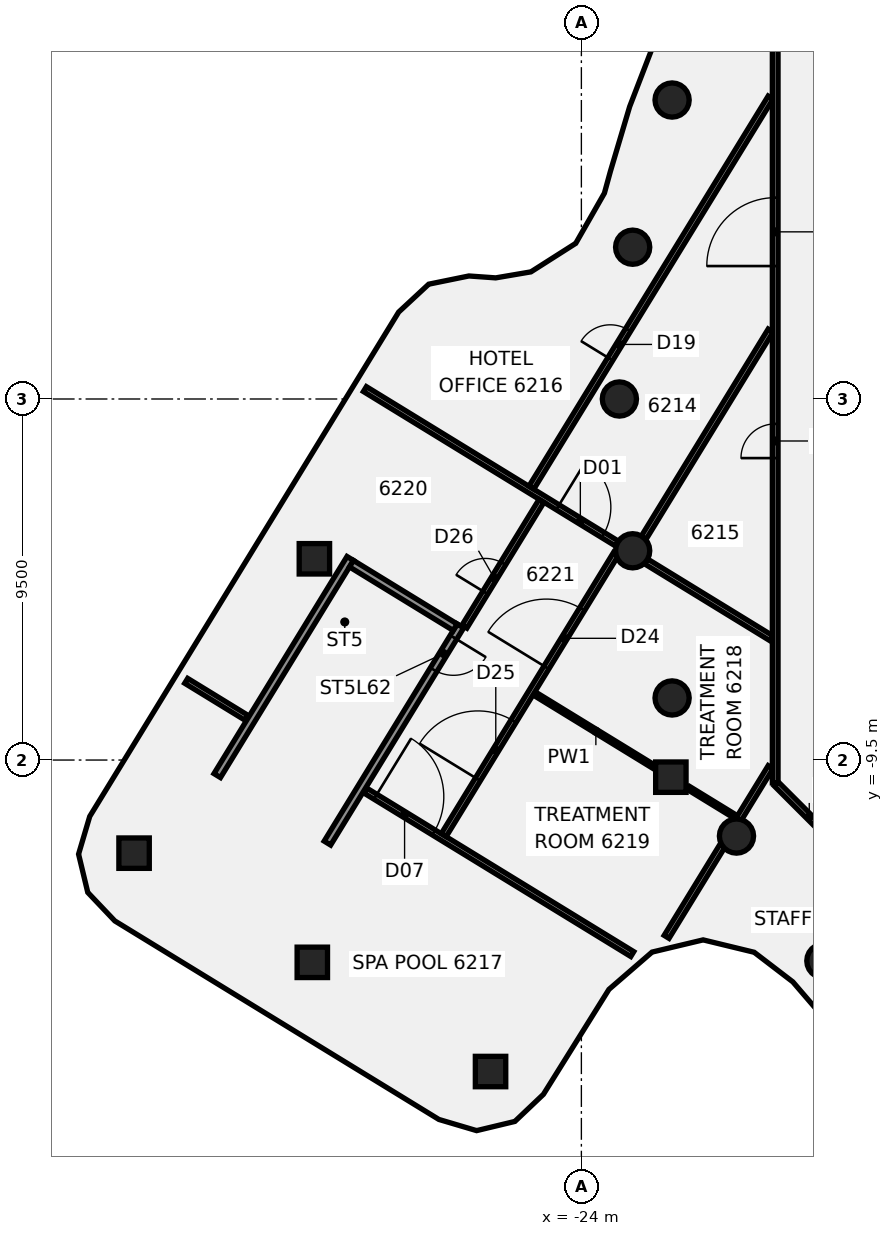
"""IFC4 building model, lengths in metres.
Left out: names, types, materials, properties, quantities, classifications, styles, units other than length and angle.
Written with IfcOpenShell. Run it as: python <this file> out.ifc"""

import sys

from ifc_helpers import new_model, si_unit, direction, frame, frame_2d, origin, origin_2d, place, context, subcontext, project, spatial, polyline, rectangle, circle, outline, extrude, element, fill, save


model = new_model("IFC4")
c1 = context("Model", 3, precision=1e-05, world=origin(), true_north=direction((0.0, 1.0)))
c2 = subcontext(c1, "Body", "Model", "MODEL_VIEW")
j1 = project(units=[si_unit("LENGTHUNIT", "METRE"), si_unit("PLANEANGLEUNIT", "RADIAN")], contexts=[c1])
p1 = place(None, origin())
s1 = spatial("IfcSite", under=j1, at=p1, CompositionType="ELEMENT")
p2 = place(p1, origin())
s2 = spatial("IfcBuilding", under=s1, at=p2, CompositionType="ELEMENT")
p3 = place(p2, frame((0.0, 0.0, 245.1)))
s3 = spatial("IfcBuildingStorey", under=s2, at=p3, CompositionType="ELEMENT", Elevation=245.1)
for number, where, z_axis, x_axis in (
    (1, (-21.613, 7.866, -0.14), (0.0, 0.0, 1.0), (1.0, 0.0, 0.0)),
    (2, (-22.651, 3.994, -0.14), (0.0, 0.0, 1.0), (1.0, 0.0, 0.0)),
    (3, (-23.0, 0.0, -0.14), (0.0, 0.0, 1.0), (1.0, 0.0, 0.0)),
    (4, (-22.651, -3.994, -0.14), (0.0, 0.0, 1.0), (1.0, 0.0, 0.0)),
    (5, (-21.613, -7.866, -0.14), (0.0, 0.0, 1.0), (1.0, 0.0, 0.0)),
    (6, (-19.919, -11.5, -0.14), (0.0, 0.0, 1.0), (1.0, 0.0, 0.0)),
    (7, (-17.619, -14.784, -0.14), (0.0, 0.0, 1.0), (1.0, 0.0, 0.0)),
):
    element("IfcColumn", number, at=place(p3, frame(where, z_axis=z_axis, x_axis=x_axis)), inside=s3, PredefinedType="COLUMN", context=c2, shape_type="SweptSolid", body=[
        extrude(circle(Radius=0.45, at=origin_2d()), origin(), (0.0, 0.0, 1.0), 3.6),
    ])
p4 = place(p3, frame((-21.646, -9.951, -0.139), z_axis=(0.050289032263, 0.002304349187, 0.998732047753), x_axis=(-0.852234898638, 0.521494023038, 0.041709249322)))
e8 = element("IfcColumn", 8, at=p4, inside=s3, PredefinedType="COLUMN", context=c2, shape_type="SweptSolid", body=[
    extrude(rectangle(XDim=0.8, YDim=0.8, at=origin_2d()), origin(), (0.0, 0.0, 1.0), 3.602),
])
p5 = place(p3, frame((-31.026, -4.205, -0.139), z_axis=(0.021689414604, -0.045479991248, 0.998729763094), x_axis=(0.522728696962, 0.852057085106, 0.027448735737)))
e9 = element("IfcColumn", 9, at=p5, inside=s3, PredefinedType="COLUMN", context=c2, shape_type="SweptSolid", body=[
    extrude(rectangle(XDim=0.8, YDim=0.8, at=origin_2d()), origin(), (0.0, 0.0, 1.0), 3.602),
])
p6 = place(p3, frame((-35.77, -11.95, -0.138), z_axis=(0.110986242097, 0.016732272365, 0.993681078177), x_axis=(-0.84816015737, 0.522723880647, 0.085930739847)))
e10 = element("IfcColumn", 10, at=p6, inside=s3, PredefinedType="COLUMN", context=c2, shape_type="SweptSolid", body=[
    extrude(rectangle(XDim=0.8, YDim=0.8, at=origin_2d()), origin(), (0.0, 0.0, 1.0), 3.619),
])
p7 = place(p3, frame((-31.08, -14.823, -0.138), z_axis=(0.124994195598, 0.040318536975, 0.991337917485), x_axis=(-0.84726684636, 0.524239786141, 0.085507529997)))
e11 = element("IfcColumn", 11, at=p7, inside=s3, PredefinedType="COLUMN", context=c2, shape_type="SweptSolid", body=[
    extrude(rectangle(XDim=0.8, YDim=0.8, at=origin_2d()), origin(), (0.0, 0.0, 1.0), 3.627),
])
p8 = place(p3, frame((-26.39, -17.696, -0.138), z_axis=(0.138708770206, 0.063818113433, 0.988274822843), x_axis=(-0.846851158374, 0.525000356657, 0.084957289684)))
e12 = element("IfcColumn", 12, at=p8, inside=s3, PredefinedType="COLUMN", context=c2, shape_type="SweptSolid", body=[
    extrude(rectangle(XDim=0.8, YDim=0.8, at=origin_2d()), origin(), (0.0, 0.0, 1.0), 3.638),
])
p9 = place(p3, frame((-18.872, -10.128, 0.0), z_axis=(0.0, 0.0, 1.0), x_axis=(0.707106781187, -0.707106781187, 0.0)))
e13 = element("IfcWall", 13, at=p9, inside=s3, PredefinedType="PARTITIONING", context=c2, shape_type="SweptSolid", body=[
    extrude(rectangle(XDim=2.455, YDim=0.15, at=frame_2d((1.228, 0.0))), origin(), (0.0, 0.0, 1.0), 2.864),
])
p10 = place(p3, frame((-29.696, 0.26, 0.0), z_axis=(0.0, 0.0, 1.0), x_axis=(0.852605760598, -0.522554702395, 0.0)))
e14 = element("IfcWall", 14, at=p10, inside=s3, PredefinedType="PARTITIONING", context=c2, shape_type="SweptSolid", body=[
    extrude(rectangle(XDim=7.783, YDim=0.15, at=frame_2d((3.892, 0.0))), origin(), (0.0, 0.0, 1.0), 2.864),
])
p11 = place(p10, frame((5.949, 0.0, 0.0)))
e15 = element("IfcOpeningElement", 15, at=p11, cuts=e14, PredefinedType="OPENING", context=c2, shape_type="SweptSolid", body=[
    extrude(rectangle(XDim=1.4, YDim=2.1, at=frame_2d((0.7, 1.05))), frame((0.0, 0.085, 0.0), z_axis=(0.0, -1.0, 0.0), x_axis=(1.0, 0.0, 0.0)), (0.0, 0.0, 1.0), 0.17),
])
p12 = place(p3, frame((-22.301, -4.272, 0.0), z_axis=(0.0, 0.0, 1.0), x_axis=(0.852599442673, -0.522565010648, 0.0)))
e16 = element("IfcWall", 16, at=p12, inside=s3, PredefinedType="PARTITIONING", context=c2, shape_type="SweptSolid", body=[
    extrude(rectangle(XDim=3.878, YDim=0.15, at=frame_2d((1.939, 0.0))), origin(), (0.0, 0.0, 1.0), 2.864),
])
p13 = place(p3, frame((-34.399, -7.416, 0.0), z_axis=(0.0, 0.0, 1.0), x_axis=(0.852752221209, -0.522315660519, 0.0)))
e17 = element("IfcWall", 17, at=p13, inside=s3, PredefinedType="PARTITIONING", context=c2, shape_type="SweptSolid", body=[
    extrude(rectangle(XDim=1.859, YDim=0.15, at=frame_2d((0.929, 0.0))), origin(), (0.0, 0.0, 1.0), 2.864),
])
p14 = place(p3, frame((-29.676, -10.309, 0.0), z_axis=(0.0, 0.0, 1.0), x_axis=(0.852748796972, -0.522321251016, 0.0)))
e18 = element("IfcWall", 18, at=p14, inside=s3, PredefinedType="PARTITIONING", context=c2, shape_type="SweptSolid", body=[
    extrude(rectangle(XDim=8.227, YDim=0.15, at=frame_2d((4.113, 0.0))), origin(), (0.0, 0.0, 1.0), 2.864),
])
p15 = place(p14, frame((0.3, 0.0, 0.0)))
e19 = element("IfcOpeningElement", 19, at=p15, cuts=e18, PredefinedType="OPENING", context=c2, shape_type="SweptSolid", body=[
    extrude(rectangle(XDim=1.8, YDim=2.1, at=frame_2d((0.9, 1.05))), frame((0.0, 0.085, 0.0), z_axis=(0.0, -1.0, 0.0), x_axis=(1.0, 0.0, 0.0)), (0.0, 0.0, 1.0), 0.17),
])
p16 = place(p3, frame((-25.248, -7.743, 0.0), z_axis=(0.0, 0.0, 1.0), x_axis=(0.852641647662, -0.522496144169, 0.0)))
e20 = element("IfcWall", 20, at=p16, inside=s3, PredefinedType="PARTITIONING", context=c2, shape_type="SweptSolid", body=[
    extrude(rectangle(XDim=3.822, YDim=0.1, at=frame_2d((1.911, 0.0))), origin(), (0.0, 0.0, 1.0), 2.864),
])
p17 = place(p3, frame((-21.177, -10.238, 0.0), z_axis=(0.0, 0.0, 1.0), x_axis=(0.852622654042, -0.522527137874, 0.0)))
e21 = element("IfcWall", 21, at=p17, inside=s3, PredefinedType="PARTITIONING", context=c2, shape_type="SweptSolid", body=[
    extrude(rectangle(XDim=1.476, YDim=0.1, at=frame_2d((0.738, 0.0))), origin(), (0.0, 0.0, 1.0), 2.864),
])
p18 = place(p3, frame((-21.758, -14.153, 0.0), z_axis=(0.0, 0.0, 1.0), x_axis=(0.522549830929, 0.852608746258, 0.0)))
e22 = element("IfcWall", 22, at=p18, inside=s3, PredefinedType="PARTITIONING", context=c2, shape_type="SweptSolid", body=[
    extrude(rectangle(XDim=2.809, YDim=0.15, at=frame_2d((1.405, 0.0))), origin(), (0.0, 0.0, 1.0), 2.864),
])
p19 = place(p3, frame((-19.86, -11.056, 0.0), z_axis=(0.0, 0.0, 1.0), x_axis=(0.522579863892, 0.852590338823, 0.0)))
e23 = element("IfcWall", 23, at=p19, inside=s3, PredefinedType="PARTITIONING", context=c2, shape_type="SweptSolid", body=[
    extrude(rectangle(XDim=1.608, YDim=0.15, at=frame_2d((0.804, 0.0))), origin(), (0.0, 0.0, 1.0), 2.864),
])
p20 = place(p3, frame((-25.315, -2.332, 0.0), z_axis=(0.0, 0.0, 1.0), x_axis=(0.522799283553, 0.852455810653, 0.0)))
e24 = element("IfcWall", 24, at=p20, inside=s3, PredefinedType="PARTITIONING", context=c2, shape_type="SweptSolid", body=[
    extrude(rectangle(XDim=12.041, YDim=0.15, at=frame_2d((6.021, 0.0))), origin(), (0.0, 0.0, 1.0), 2.864),
])
p21 = place(p20, frame((3.97, 0.0, 0.0)))
e25 = element("IfcOpeningElement", 25, at=p21, cuts=e24, PredefinedType="OPENING", context=c2, shape_type="SweptSolid", body=[
    extrude(rectangle(XDim=0.9, YDim=2.1, at=frame_2d((0.45, 1.05))), frame((0.0, 0.085, 0.0), z_axis=(0.0, -1.0, 0.0), x_axis=(1.0, 0.0, 0.0)), (0.0, 0.0, 1.0), 0.17),
])
p22 = place(p3, frame((-27.621, -11.474, 0.0), z_axis=(0.0, 0.0, 1.0), x_axis=(0.522331772483, 0.852742352329, 0.0)))
e26 = element("IfcWall", 26, at=p22, inside=s3, PredefinedType="PARTITIONING", context=c2, shape_type="SweptSolid", body=[
    extrude(rectangle(XDim=8.677, YDim=0.15, at=frame_2d((4.338, 0.0))), origin(), (0.0, 0.0, 1.0), 2.864),
])
p23 = place(p22, frame((5.171, 0.0, 0.0)))
e27 = element("IfcOpeningElement", 27, at=p23, cuts=e26, PredefinedType="OPENING", context=c2, shape_type="SweptSolid", body=[
    extrude(rectangle(XDim=1.8, YDim=2.1, at=frame_2d((0.9, 1.05))), frame((0.0, 0.085, 0.0), z_axis=(0.0, -1.0, 0.0), x_axis=(1.0, 0.0, 0.0)), (0.0, 0.0, 1.0), 0.17),
])
p24 = place(p22, frame((1.72, 0.0, 0.0)))
e28 = element("IfcOpeningElement", 28, at=p24, cuts=e26, PredefinedType="OPENING", context=c2, shape_type="SweptSolid", body=[
    extrude(rectangle(XDim=1.8, YDim=2.1, at=frame_2d((0.9, 1.05))), frame((0.0, 0.085, 0.0), z_axis=(0.0, -1.0, 0.0), x_axis=(1.0, 0.0, 0.0)), (0.0, 0.0, 1.0), 0.17),
])
p25 = place(p3, frame((-27.077, -5.99, 0.0), z_axis=(0.0, 0.0, 1.0), x_axis=(0.522393858558, 0.852704319528, 0.0)))
e29 = element("IfcWall", 29, at=p25, inside=s3, PredefinedType="PARTITIONING", context=c2, shape_type="SweptSolid", body=[
    extrude(rectangle(XDim=3.88, YDim=0.15, at=frame_2d((1.94, 0.0))), origin(), (0.0, 0.0, 1.0), 2.864),
])
p26 = place(p25, frame((1.05, 0.0, 0.0)))
e30 = element("IfcOpeningElement", 30, at=p26, cuts=e29, PredefinedType="OPENING", context=c2, shape_type="SweptSolid", body=[
    extrude(rectangle(XDim=0.9, YDim=2.1, at=frame_2d((0.45, 1.05))), frame((0.0, 0.085, 0.0), z_axis=(0.0, -1.0, 0.0), x_axis=(1.0, 0.0, 0.0)), (0.0, 0.0, 1.0), 0.17),
])
p27 = place(p3, frame((-22.362, -3.654, 0.0), z_axis=(0.0, 0.0, 1.0), x_axis=(0.522380406817, 0.852712560347, 0.0)))
e31 = element("IfcWall", 31, at=p27, inside=s3, PredefinedType="PARTITIONING", context=c2, shape_type="SweptSolid", body=[
    extrude(rectangle(XDim=6.398, YDim=0.15, at=frame_2d((3.199, 0.0))), origin(), (0.0, 0.0, 1.0), 2.864),
])
p28 = place(p3, frame((-18.9, -10.1, 0.0), z_axis=(0.0, 0.0, 1.0), x_axis=(0.0, 1.0, 0.0)))
e32 = element("IfcWall", 32, at=p28, inside=s3, PredefinedType="PARTITIONING", context=c2, shape_type="SweptSolid", body=[
    extrude(rectangle(XDim=20.2, YDim=0.15, at=frame_2d((10.1, 0.0))), origin(), (0.0, 0.0, 1.0), 2.864),
])
p29 = place(p28, frame((13.598, 0.0, 0.0)))
e33 = element("IfcOpeningElement", 33, at=p29, cuts=e32, PredefinedType="OPENING", context=c2, shape_type="SweptSolid", body=[
    extrude(rectangle(XDim=1.8, YDim=2.1, at=frame_2d((0.9, 1.05))), frame((0.0, 0.085, 0.0), z_axis=(0.0, -1.0, 0.0), x_axis=(1.0, 0.0, 0.0)), (0.0, 0.0, 1.0), 0.17),
])
p30 = place(p28, frame((8.545, 0.0, 0.0)))
e34 = element("IfcOpeningElement", 34, at=p30, cuts=e32, PredefinedType="OPENING", context=c2, shape_type="SweptSolid", body=[
    extrude(rectangle(XDim=0.9, YDim=2.1, at=frame_2d((0.45, 1.05))), frame((0.0, 0.085, 0.0), z_axis=(0.0, -1.0, 0.0), x_axis=(1.0, 0.0, 0.0)), (0.0, 0.0, 1.0), 0.17),
])
p31 = place(p3, frame((-27.183, -5.972, -0.14), z_axis=(0.0, 0.0, 1.0), x_axis=(-0.522362094183, -0.852723778583, 0.0)))
e35 = element("IfcWall", 35, at=p31, inside=s3, PredefinedType="SHEAR", context=c2, shape_type="SweptSolid", body=[
    extrude(rectangle(XDim=6.7, YDim=0.2, at=frame_2d((3.35, 0.0))), origin(), (0.0, 0.0, 1.0), 3.004),
])
p32 = place(p31, frame((0.35, 0.0, 0.0)))
e36 = element("IfcOpeningElement", 36, at=p32, cuts=e35, PredefinedType="OPENING", context=c2, shape_type="SweptSolid", body=[
    extrude(rectangle(XDim=1.0, YDim=2.1, at=frame_2d((0.5, 1.05))), frame((0.0, 0.11, 0.0), z_axis=(0.0, -1.0, 0.0), x_axis=(1.0, 0.0, 0.0)), (0.0, 0.0, 1.0), 0.22),
])
p33 = place(p3, frame((-30.082, -4.196, -0.14), z_axis=(0.0, 0.0, 1.0), x_axis=(-0.522362094183, -0.852723778583, 0.0)))
e37 = element("IfcWall", 37, at=p33, inside=s3, PredefinedType="SHEAR", context=c2, shape_type="SweptSolid", body=[
    extrude(rectangle(XDim=6.7, YDim=0.2, at=frame_2d((3.35, 0.0))), origin(), (0.0, 0.0, 1.0), 3.004),
])
p34 = place(p3, frame((-30.049, -4.333, -0.14), z_axis=(0.0, 0.0, 1.0), x_axis=(0.852717458559, -0.52237241109, 0.0)))
e38 = element("IfcWall", 38, at=p34, inside=s3, PredefinedType="SHEAR", context=c2, shape_type="SweptSolid", body=[
    extrude(rectangle(XDim=3.2, YDim=0.2, at=frame_2d((1.6, 0.0))), origin(), (0.0, 0.0, 1.0), 3.004),
])
p35 = place(p3, frame((0.0, 0.0, -0.14)))
e39 = element("IfcWall", 39, at=p35, inside=s3, PredefinedType="SHEAR", context=c2, shape_type="SweptSolid", body=[
    extrude(outline(polyline([(-33.392, -9.791), (-33.497, -9.962), (-30.768, -11.633), (-30.664, -11.463), (-33.392, -9.791)])), origin(), (0.0, 0.0, 1.0), 3.004),
])
p36 = place(p11, origin())
e40 = element("IfcDoor", 40, at=p36, inside=s3, OperationType="DOUBLE_DOOR_SINGLE_SWING", PredefinedType="DOOR", context=c2, shape_type="SweptSolid", body=[
    extrude(rectangle(XDim=1.4, YDim=2.1, at=frame_2d((0.7, 1.05))), frame((0.0, 0.025, 0.0), z_axis=(0.0, -1.0, 0.0), x_axis=(1.0, 0.0, 0.0)), (0.0, 0.0, 1.0), 0.05),
])
fill(e15, e40)
p37 = place(p15, frame((1.8, 0.0, 0.0), z_axis=(0.0, 0.0, 1.0), x_axis=(-1.0, 0.0, 0.0)))
e41 = element("IfcDoor", 41, at=p37, inside=s3, OperationType="DOUBLE_DOOR_SINGLE_SWING", PredefinedType="DOOR", context=c2, shape_type="SweptSolid", body=[
    extrude(rectangle(XDim=1.8, YDim=2.1, at=frame_2d((0.9, 1.05))), frame((0.0, 0.025, 0.0), z_axis=(0.0, -1.0, 0.0), x_axis=(1.0, 0.0, 0.0)), (0.0, 0.0, 1.0), 0.05),
])
fill(e19, e41)
p38 = place(p21, origin())
e42 = element("IfcDoor", 42, at=p38, inside=s3, OperationType="SINGLE_SWING_RIGHT", PredefinedType="DOOR", context=c2, shape_type="SweptSolid", body=[
    extrude(rectangle(XDim=0.9, YDim=2.1, at=frame_2d((0.45, 1.05))), frame((0.0, 0.025, 0.0), z_axis=(0.0, -1.0, 0.0), x_axis=(1.0, 0.0, 0.0)), (0.0, 0.0, 1.0), 0.05),
])
fill(e25, e42)
p39 = place(p23, frame((1.8, 0.0, 0.0), z_axis=(0.0, 0.0, 1.0), x_axis=(-1.0, 0.0, 0.0)))
e43 = element("IfcDoor", 43, at=p39, inside=s3, OperationType="DOUBLE_DOOR_SINGLE_SWING", PredefinedType="DOOR", context=c2, shape_type="SweptSolid", body=[
    extrude(rectangle(XDim=1.8, YDim=2.1, at=frame_2d((0.9, 1.05))), frame((0.0, 0.025, 0.0), z_axis=(0.0, -1.0, 0.0), x_axis=(1.0, 0.0, 0.0)), (0.0, 0.0, 1.0), 0.05),
])
fill(e27, e43)
p40 = place(p24, frame((1.8, 0.0, 0.0), z_axis=(0.0, 0.0, 1.0), x_axis=(-1.0, 0.0, 0.0)))
e44 = element("IfcDoor", 44, at=p40, inside=s3, OperationType="DOUBLE_DOOR_SINGLE_SWING", PredefinedType="DOOR", context=c2, shape_type="SweptSolid", body=[
    extrude(rectangle(XDim=1.8, YDim=2.1, at=frame_2d((0.9, 1.05))), frame((0.0, 0.025, 0.0), z_axis=(0.0, -1.0, 0.0), x_axis=(1.0, 0.0, 0.0)), (0.0, 0.0, 1.0), 0.05),
])
fill(e28, e44)
p41 = place(p26, origin())
e45 = element("IfcDoor", 45, at=p41, inside=s3, OperationType="SINGLE_SWING_RIGHT", PredefinedType="DOOR", context=c2, shape_type="SweptSolid", body=[
    extrude(rectangle(XDim=0.9, YDim=2.1, at=frame_2d((0.45, 1.05))), frame((0.0, 0.025, 0.0), z_axis=(0.0, -1.0, 0.0), x_axis=(1.0, 0.0, 0.0)), (0.0, 0.0, 1.0), 0.05),
])
fill(e30, e45)
p42 = place(p29, frame((1.8, 0.0, 0.0), z_axis=(0.0, 0.0, 1.0), x_axis=(-1.0, 0.0, 0.0)))
e46 = element("IfcDoor", 46, at=p42, inside=s3, OperationType="DOUBLE_DOOR_SINGLE_SWING", PredefinedType="DOOR", context=c2, shape_type="SweptSolid", body=[
    extrude(rectangle(XDim=1.8, YDim=2.1, at=frame_2d((0.9, 1.05))), frame((0.0, 0.025, 0.0), z_axis=(0.0, -1.0, 0.0), x_axis=(1.0, 0.0, 0.0)), (0.0, 0.0, 1.0), 0.05),
])
fill(e33, e46)
p43 = place(p30, origin())
e47 = element("IfcDoor", 47, at=p43, inside=s3, OperationType="SINGLE_SWING_RIGHT", PredefinedType="DOOR", context=c2, shape_type="SweptSolid", body=[
    extrude(rectangle(XDim=0.9, YDim=2.1, at=frame_2d((0.45, 1.05))), frame((0.0, 0.025, 0.0), z_axis=(0.0, -1.0, 0.0), x_axis=(1.0, 0.0, 0.0)), (0.0, 0.0, 1.0), 0.05),
])
fill(e34, e47)
p44 = place(p32, origin())
e48 = element("IfcDoor", 48, at=p44, inside=s3, OperationType="SINGLE_SWING_LEFT", PredefinedType="DOOR", context=c2, shape_type="SweptSolid", body=[
    extrude(rectangle(XDim=1.0, YDim=2.1, at=frame_2d((0.5, 1.05))), frame((0.0, 0.025, 0.0), z_axis=(0.0, -1.0, 0.0), x_axis=(1.0, 0.0, 0.0)), (0.0, 0.0, 1.0), 0.05),
])
fill(e36, e48)
save(model, sys.argv[1])
